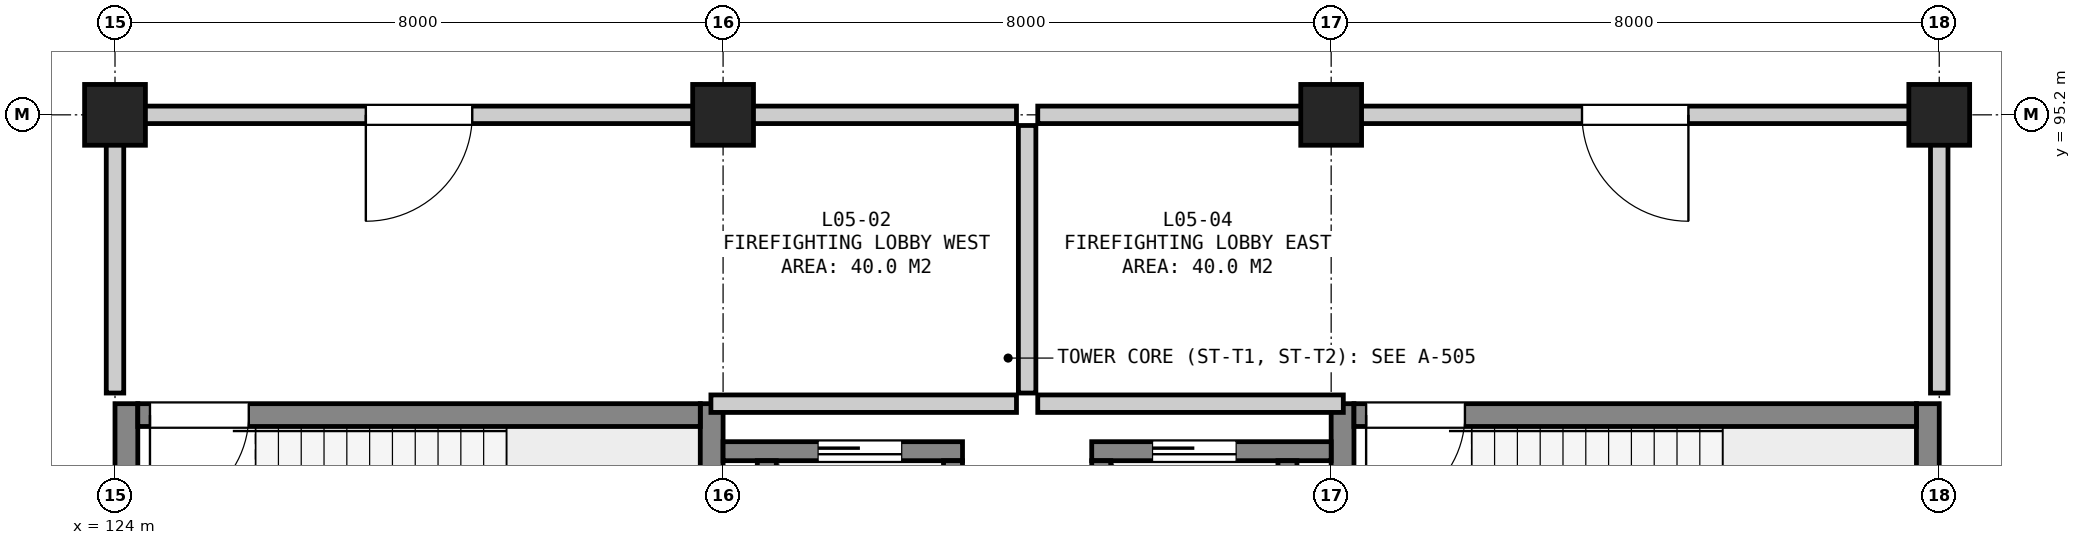
"""IFC4 building model, lengths in metres.
Left out: names, types, materials, properties, quantities, classifications, styles, units other than length and angle.
Written with IfcOpenShell. Run it as: python <this file> out.ifc"""

import sys

from ifc_helpers import new_model, si_unit, direction, frame, frame_2d, origin, origin_2d, place, context, subcontext, project, spatial, rectangle, extrude, element, fill, save


model = new_model("IFC4")
c1 = context("Model", 3, precision=1e-05, world=origin(), true_north=direction((0.0, 1.0)))
c2 = subcontext(c1, "Body", "Model", "MODEL_VIEW")
j1 = project(units=[si_unit("LENGTHUNIT", "METRE"), si_unit("PLANEANGLEUNIT", "RADIAN")], contexts=[c1])
p1 = place(None, origin())
s1 = spatial("IfcSite", under=j1, at=p1, CompositionType="ELEMENT")
p2 = place(p1, origin())
s2 = spatial("IfcBuilding", under=s1, at=p2, CompositionType="ELEMENT")
p3 = place(p2, frame((0.0, 0.0, 23.8)))
s3 = spatial("IfcBuildingStorey", under=s2, at=p3, CompositionType="ELEMENT", Elevation=23.8)
for number, where, z_axis, x_axis in (
    (1, (124.0, 95.2, 0.0), (0.0, 0.0, 1.0), (1.0, 0.0, 0.0)),
    (2, (132.0, 95.2, 0.0), (0.0, 0.0, 1.0), (1.0, 0.0, 0.0)),
    (3, (140.0, 95.2, 0.0), (0.0, 0.0, 1.0), (1.0, 0.0, 0.0)),
    (4, (148.0, 95.2, 0.0), (0.0, 0.0, 1.0), (1.0, 0.0, 0.0)),
):
    element("IfcColumn", number, at=place(p3, frame(where, z_axis=z_axis, x_axis=x_axis)), inside=s3, PredefinedType="COLUMN", context=c2, shape_type="SweptSolid", body=[
        extrude(rectangle(XDim=0.8, YDim=0.8, at=origin_2d()), origin(), (0.0, 0.0, 1.0), 4.0),
    ])
for number, where, z_axis, x_axis in (
    (5, (124.15, 87.2, 0.0), (0.0, 0.0, 1.0), (0.0, 1.0, 0.0)),
    (6, (131.85, 87.2, 0.0), (0.0, 0.0, 1.0), (0.0, 1.0, 0.0)),
):
    element("IfcWall", number, at=place(p3, frame(where, z_axis=z_axis, x_axis=x_axis)), inside=s3, PredefinedType="SHEAR", context=c2, shape_type="SweptSolid", body=[
        extrude(rectangle(XDim=4.2, YDim=0.3, at=frame_2d((2.1, 0.0))), origin(), (0.0, 0.0, 1.0), 3.72),
    ])
p4 = place(p3, frame((124.3, 91.25, 0.0), z_axis=(0.0, 0.0, 1.0), x_axis=(1.0, 0.0, 0.0)))
e7 = element("IfcWall", 7, at=p4, inside=s3, PredefinedType="SHEAR", context=c2, shape_type="SweptSolid", body=[
    extrude(rectangle(XDim=7.4, YDim=0.3, at=frame_2d((3.7, 0.0))), origin(), (0.0, 0.0, 1.0), 3.72),
])
p5 = place(p4, frame((0.16, 0.0, 0.0)))
e8 = element("IfcOpeningElement", 8, at=p5, cuts=e7, PredefinedType="OPENING", context=c2, shape_type="SweptSolid", body=[
    extrude(rectangle(XDim=1.3, YDim=2.18, at=frame_2d((0.65, 1.09))), frame((0.0, 0.162, 0.0), z_axis=(0.0, -1.0, 0.0), x_axis=(1.0, 0.0, 0.0)), (0.0, 0.0, 1.0), 0.324),
])
for number, where, z_axis, x_axis in (
    (9, (140.15, 87.2, 0.0), (0.0, 0.0, 1.0), (0.0, 1.0, 0.0)),
    (10, (147.85, 87.2, 0.0), (0.0, 0.0, 1.0), (0.0, 1.0, 0.0)),
):
    element("IfcWall", number, at=place(p3, frame(where, z_axis=z_axis, x_axis=x_axis)), inside=s3, PredefinedType="SHEAR", context=c2, shape_type="SweptSolid", body=[
        extrude(rectangle(XDim=4.2, YDim=0.3, at=frame_2d((2.1, 0.0))), origin(), (0.0, 0.0, 1.0), 3.72),
    ])
p6 = place(p3, frame((140.3, 91.25, 0.0), z_axis=(0.0, 0.0, 1.0), x_axis=(1.0, 0.0, 0.0)))
e11 = element("IfcWall", 11, at=p6, inside=s3, PredefinedType="SHEAR", context=c2, shape_type="SweptSolid", body=[
    extrude(rectangle(XDim=7.4, YDim=0.3, at=frame_2d((3.7, 0.0))), origin(), (0.0, 0.0, 1.0), 3.72),
])
p7 = place(p6, frame((0.16, 0.0, 0.0)))
e12 = element("IfcOpeningElement", 12, at=p7, cuts=e11, PredefinedType="OPENING", context=c2, shape_type="SweptSolid", body=[
    extrude(rectangle(XDim=1.3, YDim=2.18, at=frame_2d((0.65, 1.09))), frame((0.0, 0.162, 0.0), z_axis=(0.0, -1.0, 0.0), x_axis=(1.0, 0.0, 0.0)), (0.0, 0.0, 1.0), 0.324),
])
p8 = place(p3, frame((132.0, 90.775, 0.0), z_axis=(0.0, 0.0, 1.0), x_axis=(1.0, 0.0, 0.0)))
e13 = element("IfcWall", 13, at=p8, inside=s3, PredefinedType="SHEAR", context=c2, shape_type="SweptSolid", body=[
    extrude(rectangle(XDim=3.15, YDim=0.25, at=frame_2d((1.575, 0.0))), origin(), (0.0, 0.0, 1.0), 3.72),
])
p9 = place(p8, frame((1.25, 0.0, 0.0)))
e14 = element("IfcOpeningElement", 14, at=p9, cuts=e13, PredefinedType="OPENING", context=c2, shape_type="SweptSolid", body=[
    extrude(rectangle(XDim=1.1, YDim=2.15, at=frame_2d((0.55, 1.075))), frame((0.0, 0.137, 0.0), z_axis=(0.0, -1.0, 0.0), x_axis=(1.0, 0.0, 0.0)), (0.0, 0.0, 1.0), 0.274),
])
for number, where, z_axis, x_axis in (
    (15, (132.575, 87.75, 0.0), (0.0, 0.0, 1.0), (0.0, 1.0, 0.0)),
    (16, (135.025, 87.75, 0.0), (0.0, 0.0, 1.0), (0.0, 1.0, 0.0)),
):
    element("IfcWall", number, at=place(p3, frame(where, z_axis=z_axis, x_axis=x_axis)), inside=s3, PredefinedType="SHEAR", context=c2, shape_type="SweptSolid", body=[
        extrude(rectangle(XDim=2.9, YDim=0.25, at=frame_2d((1.45, 0.0))), origin(), (0.0, 0.0, 1.0), 3.72),
    ])
p10 = place(p3, frame((136.85, 90.775, 0.0), z_axis=(0.0, 0.0, 1.0), x_axis=(1.0, 0.0, 0.0)))
e17 = element("IfcWall", 17, at=p10, inside=s3, PredefinedType="SHEAR", context=c2, shape_type="SweptSolid", body=[
    extrude(rectangle(XDim=3.15, YDim=0.25, at=frame_2d((1.575, 0.0))), origin(), (0.0, 0.0, 1.0), 3.72),
])
p11 = place(p10, frame((0.8, 0.0, 0.0)))
e18 = element("IfcOpeningElement", 18, at=p11, cuts=e17, PredefinedType="OPENING", context=c2, shape_type="SweptSolid", body=[
    extrude(rectangle(XDim=1.1, YDim=2.15, at=frame_2d((0.55, 1.075))), frame((0.0, 0.137, 0.0), z_axis=(0.0, -1.0, 0.0), x_axis=(1.0, 0.0, 0.0)), (0.0, 0.0, 1.0), 0.274),
])
for number, where, z_axis, x_axis in (
    (19, (136.975, 87.75, 0.0), (0.0, 0.0, 1.0), (0.0, 1.0, 0.0)),
    (20, (139.425, 87.75, 0.0), (0.0, 0.0, 1.0), (0.0, 1.0, 0.0)),
):
    element("IfcWall", number, at=place(p3, frame(where, z_axis=z_axis, x_axis=x_axis)), inside=s3, PredefinedType="SHEAR", context=c2, shape_type="SweptSolid", body=[
        extrude(rectangle(XDim=2.9, YDim=0.25, at=frame_2d((1.45, 0.0))), origin(), (0.0, 0.0, 1.0), 3.72),
    ])
p12 = place(p3, frame((131.84, 91.4, 0.0), z_axis=(0.0, 0.0, 1.0), x_axis=(1.0, 0.0, 0.0)))
e21 = element("IfcWall", 21, at=p12, inside=s3, PredefinedType="SOLIDWALL", context=c2, shape_type="SweptSolid", body=[
    extrude(rectangle(XDim=4.02, YDim=0.23, at=frame_2d((2.01, 0.0))), origin(), (0.0, 0.0, 1.0), 3.72),
])
p13 = place(p3, frame((124.14, 95.2, 0.0), z_axis=(0.0, 0.0, 1.0), x_axis=(1.0, 0.0, 0.0)))
e22 = element("IfcWall", 22, at=p13, inside=s3, PredefinedType="SOLIDWALL", context=c2, shape_type="SweptSolid", body=[
    extrude(rectangle(XDim=11.72, YDim=0.23, at=frame_2d((5.86, 0.0))), origin(), (0.0, 0.0, 1.0), 2.945),
])
p14 = place(p13, frame((3.16, 0.0, 0.0)))
e23 = element("IfcOpeningElement", 23, at=p14, cuts=e22, PredefinedType="OPENING", context=c2, shape_type="SweptSolid", body=[
    extrude(rectangle(XDim=1.4, YDim=2.2, at=frame_2d((0.7, 1.1))), frame((0.0, 0.127, 0.0), z_axis=(0.0, -1.0, 0.0), x_axis=(1.0, 0.0, 0.0)), (0.0, 0.0, 1.0), 0.254),
])
p15 = place(p3, frame((124.0, 91.54, 0.0), z_axis=(0.0, 0.0, 1.0), x_axis=(0.0, 1.0, 0.0)))
e24 = element("IfcWall", 24, at=p15, inside=s3, PredefinedType="SOLIDWALL", context=c2, shape_type="SweptSolid", body=[
    extrude(rectangle(XDim=3.52, YDim=0.23, at=frame_2d((1.76, 0.0))), origin(), (0.0, 0.0, 1.0), 3.095),
])
p16 = place(p3, frame((136.0, 91.54, 0.0), z_axis=(0.0, 0.0, 1.0), x_axis=(0.0, 1.0, 0.0)))
e25 = element("IfcWall", 25, at=p16, inside=s3, PredefinedType="SOLIDWALL", context=c2, shape_type="SweptSolid", body=[
    extrude(rectangle(XDim=3.52, YDim=0.23, at=frame_2d((1.76, 0.0))), origin(), (0.0, 0.0, 1.0), 3.72),
])
p17 = place(p3, frame((136.14, 91.4, 0.0), z_axis=(0.0, 0.0, 1.0), x_axis=(1.0, 0.0, 0.0)))
e26 = element("IfcWall", 26, at=p17, inside=s3, PredefinedType="SOLIDWALL", context=c2, shape_type="SweptSolid", body=[
    extrude(rectangle(XDim=4.02, YDim=0.23, at=frame_2d((2.01, 0.0))), origin(), (0.0, 0.0, 1.0), 3.72),
])
p18 = place(p3, frame((136.14, 95.2, 0.0), z_axis=(0.0, 0.0, 1.0), x_axis=(1.0, 0.0, 0.0)))
e27 = element("IfcWall", 27, at=p18, inside=s3, PredefinedType="SOLIDWALL", context=c2, shape_type="SweptSolid", body=[
    extrude(rectangle(XDim=11.72, YDim=0.23, at=frame_2d((5.86, 0.0))), origin(), (0.0, 0.0, 1.0), 2.995),
])
p19 = place(p18, frame((7.16, 0.0, 0.0)))
e28 = element("IfcOpeningElement", 28, at=p19, cuts=e27, PredefinedType="OPENING", context=c2, shape_type="SweptSolid", body=[
    extrude(rectangle(XDim=1.4, YDim=2.2, at=frame_2d((0.7, 1.1))), frame((0.0, 0.127, 0.0), z_axis=(0.0, -1.0, 0.0), x_axis=(1.0, 0.0, 0.0)), (0.0, 0.0, 1.0), 0.254),
])
p20 = place(p3, frame((148.0, 91.54, 0.0), z_axis=(0.0, 0.0, 1.0), x_axis=(0.0, 1.0, 0.0)))
e29 = element("IfcWall", 29, at=p20, inside=s3, PredefinedType="SOLIDWALL", context=c2, shape_type="SweptSolid", body=[
    extrude(rectangle(XDim=3.52, YDim=0.23, at=frame_2d((1.76, 0.0))), origin(), (0.0, 0.0, 1.0), 2.945),
])
p21 = place(p5, frame((1.3, 0.0, 0.0), z_axis=(0.0, 0.0, 1.0), x_axis=(-1.0, 0.0, 0.0)))
e30 = element("IfcDoor", 30, at=p21, inside=s3, OperationType="SINGLE_SWING_RIGHT", PredefinedType="DOOR", context=c2, shape_type="SweptSolid", body=[
    extrude(rectangle(XDim=1.3, YDim=2.18, at=frame_2d((0.65, 1.09))), frame((0.0, 0.025, 0.0), z_axis=(0.0, -1.0, 0.0), x_axis=(1.0, 0.0, 0.0)), (0.0, 0.0, 1.0), 0.05),
])
fill(e8, e30)
p22 = place(p7, frame((1.3, 0.0, 0.0), z_axis=(0.0, 0.0, 1.0), x_axis=(-1.0, 0.0, 0.0)))
e31 = element("IfcDoor", 31, at=p22, inside=s3, OperationType="SINGLE_SWING_RIGHT", PredefinedType="DOOR", context=c2, shape_type="SweptSolid", body=[
    extrude(rectangle(XDim=1.3, YDim=2.18, at=frame_2d((0.65, 1.09))), frame((0.0, 0.025, 0.0), z_axis=(0.0, -1.0, 0.0), x_axis=(1.0, 0.0, 0.0)), (0.0, 0.0, 1.0), 0.05),
])
fill(e12, e31)
p23 = place(p9, origin())
e32 = element("IfcDoor", 32, at=p23, inside=s3, OperationType="SLIDING_TO_LEFT", PredefinedType="DOOR", context=c2, shape_type="SweptSolid", body=[
    extrude(rectangle(XDim=1.1, YDim=2.15, at=frame_2d((0.55, 1.075))), frame((0.0, 0.025, 0.0), z_axis=(0.0, -1.0, 0.0), x_axis=(1.0, 0.0, 0.0)), (0.0, 0.0, 1.0), 0.05),
])
fill(e14, e32)
p24 = place(p11, origin())
e33 = element("IfcDoor", 33, at=p24, inside=s3, OperationType="SLIDING_TO_LEFT", PredefinedType="DOOR", context=c2, shape_type="SweptSolid", body=[
    extrude(rectangle(XDim=1.1, YDim=2.15, at=frame_2d((0.55, 1.075))), frame((0.0, 0.025, 0.0), z_axis=(0.0, -1.0, 0.0), x_axis=(1.0, 0.0, 0.0)), (0.0, 0.0, 1.0), 0.05),
])
fill(e18, e33)
p25 = place(p14, frame((1.4, 0.0, 0.0), z_axis=(0.0, 0.0, 1.0), x_axis=(-1.0, 0.0, 0.0)))
e34 = element("IfcDoor", 34, at=p25, inside=s3, OperationType="SINGLE_SWING_RIGHT", PredefinedType="DOOR", context=c2, shape_type="SweptSolid", body=[
    extrude(rectangle(XDim=1.4, YDim=2.2, at=frame_2d((0.7, 1.1))), frame((0.0, 0.025, 0.0), z_axis=(0.0, -1.0, 0.0), x_axis=(1.0, 0.0, 0.0)), (0.0, 0.0, 1.0), 0.05),
])
fill(e23, e34)
p26 = place(p19, frame((1.4, 0.0, 0.0), z_axis=(0.0, 0.0, 1.0), x_axis=(-1.0, 0.0, 0.0)))
e35 = element("IfcDoor", 35, at=p26, inside=s3, OperationType="SINGLE_SWING_LEFT", PredefinedType="DOOR", context=c2, shape_type="SweptSolid", body=[
    extrude(rectangle(XDim=1.4, YDim=2.2, at=frame_2d((0.7, 1.1))), frame((0.0, 0.025, 0.0), z_axis=(0.0, -1.0, 0.0), x_axis=(1.0, 0.0, 0.0)), (0.0, 0.0, 1.0), 0.05),
])
fill(e28, e35)
save(model, sys.argv[1])
